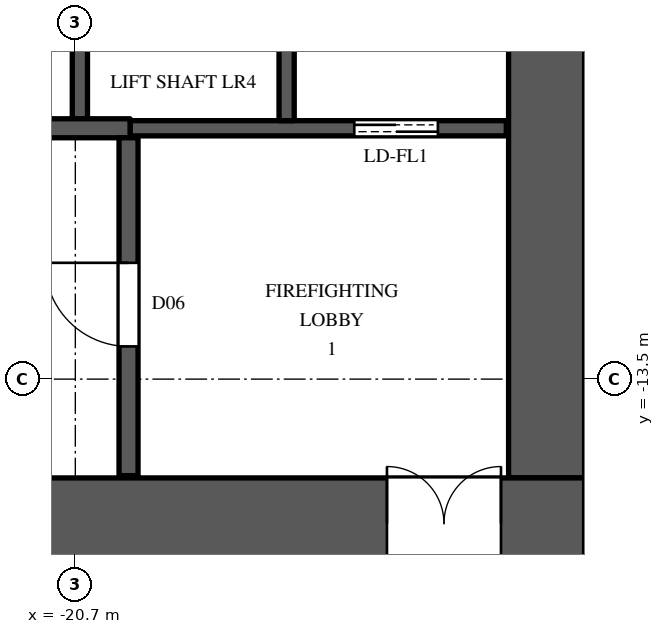
"""IFC4 building model, lengths in metres.
Left out: names, types, materials, properties, quantities, classifications, styles, units other than length and angle.
Written with IfcOpenShell. Run it as: python <this file> out.ifc"""

import sys

from ifc_helpers import new_model, si_unit, direction, frame, frame_2d, origin, place, context, subcontext, project, spatial, rectangle, extrude, element, fill, save


model = new_model("IFC4")
c1 = context("Model", 3, precision=1e-05, world=origin(), true_north=direction((0.0, 1.0)))
c2 = subcontext(c1, "Body", "Model", "MODEL_VIEW")
j1 = project(units=[si_unit("LENGTHUNIT", "METRE"), si_unit("PLANEANGLEUNIT", "RADIAN")], contexts=[c1])
p1 = place(None, origin())
s1 = spatial("IfcSite", under=j1, at=p1, CompositionType="ELEMENT")
p2 = place(p1, origin())
s2 = spatial("IfcBuilding", under=s1, at=p2, CompositionType="ELEMENT")
p3 = place(p2, frame((0.0, 0.0, 138.3)))
s3 = spatial("IfcBuildingStorey", under=s2, at=p3, CompositionType="ELEMENT", Elevation=138.3)
p4 = place(p3, frame((-30.0, -15.4, 0.0), z_axis=(0.0, 0.0, 1.0), x_axis=(1.0, 0.0, 0.0)))
e1 = element("IfcWall", 1, at=p4, inside=s3, PredefinedType="SHEAR", context=c2, shape_type="SweptSolid", body=[
    extrude(rectangle(XDim=16.0, YDim=1.2, at=frame_2d((8.0, 0.0))), origin(), (0.0, 0.0, 1.0), 3.6),
])
p5 = place(p4, frame((13.4, 0.0, 0.0)))
e2 = element("IfcOpeningElement", 2, at=p5, cuts=e1, PredefinedType="OPENING", context=c2, shape_type="SweptSolid", body=[
    extrude(rectangle(XDim=1.5, YDim=2.4, at=frame_2d((0.75, 1.2))), frame((0.0, 0.61, 0.0), z_axis=(0.0, -1.0, 0.0), x_axis=(1.0, 0.0, 0.0)), (0.0, 0.0, 1.0), 1.22),
])
p6 = place(p3, frame((-14.5, -14.8, 0.0), z_axis=(0.0, 0.0, 1.0), x_axis=(0.0, 1.0, 0.0)))
e3 = element("IfcWall", 3, at=p6, inside=s3, PredefinedType="SHEAR", context=c2, shape_type="SweptSolid", body=[
    extrude(rectangle(XDim=29.6, YDim=1.0, at=frame_2d((14.8, 0.0))), origin(), (0.0, 0.0, 1.0), 3.6),
])
p7 = place(p6, frame((8.45, 0.0, 0.0)))
e4 = element("IfcOpeningElement", 4, at=p7, cuts=e3, PredefinedType="OPENING", context=c2, shape_type="SweptSolid", body=[
    extrude(rectangle(XDim=1.5, YDim=2.4, at=frame_2d((0.75, 1.2))), frame((0.0, 0.51, 0.0), z_axis=(0.0, -1.0, 0.0), x_axis=(1.0, 0.0, 0.0)), (0.0, 0.0, 1.0), 1.02),
])
p8 = place(p6, frame((19.65, 0.0, 0.0)))
e5 = element("IfcOpeningElement", 5, at=p8, cuts=e3, PredefinedType="OPENING", context=c2, shape_type="SweptSolid", body=[
    extrude(rectangle(XDim=1.5, YDim=2.4, at=frame_2d((0.75, 1.2))), frame((0.0, 0.51, 0.0), z_axis=(0.0, -1.0, 0.0), x_axis=(1.0, 0.0, 0.0)), (0.0, 0.0, 1.0), 1.02),
])
p9 = place(p6, frame((14.5, 0.0, 0.0)))
e6 = element("IfcOpeningElement", 6, at=p9, cuts=e3, PredefinedType="OPENING", context=c2, shape_type="SweptSolid", body=[
    extrude(rectangle(XDim=0.6, YDim=2.0, at=frame_2d((0.3, 1.0))), frame((0.0, 0.51, 0.0), z_axis=(0.0, -1.0, 0.0), x_axis=(1.0, 0.0, 0.0)), (0.0, 0.0, 1.0), 1.02),
])
p10 = place(p3, frame((-20.64, -10.075, 0.0), z_axis=(0.0, 0.0, 1.0), x_axis=(0.0, 1.0, 0.0)))
e7 = element("IfcWall", 7, at=p10, inside=s3, PredefinedType="SHEAR", context=c2, shape_type="SweptSolid", body=[
    extrude(rectangle(XDim=2.575, YDim=0.2, at=frame_2d((1.288, 0.0))), origin(), (0.0, 0.0, 1.0), 3.6),
])
p11 = place(p3, frame((-19.98, -10.2, 0.0), z_axis=(0.0, 0.0, 1.0), x_axis=(1.0, 0.0, 0.0)))
e8 = element("IfcWall", 8, at=p11, inside=s3, PredefinedType="SHEAR", context=c2, shape_type="SweptSolid", body=[
    extrude(rectangle(XDim=4.95, YDim=0.2, at=frame_2d((2.475, 0.0))), origin(), (0.0, 0.0, 1.0), 3.3),
])
p12 = place(p11, frame((2.95, 0.0, 0.0)))
e9 = element("IfcOpeningElement", 9, at=p12, cuts=e8, PredefinedType="OPENING", context=c2, shape_type="SweptSolid", body=[
    extrude(rectangle(XDim=1.1, YDim=2.2, at=frame_2d((0.55, 1.1))), frame((0.0, 0.11, 0.0), z_axis=(0.0, -1.0, 0.0), x_axis=(1.0, 0.0, 0.0)), (0.0, 0.0, 1.0), 0.22),
])
p13 = place(p3, frame((-17.92, -10.1, 0.0), z_axis=(0.0, 0.0, 1.0), x_axis=(0.0, 1.0, 0.0)))
e10 = element("IfcWall", 10, at=p13, inside=s3, PredefinedType="SHEAR", context=c2, shape_type="SweptSolid", body=[
    extrude(rectangle(XDim=2.6, YDim=0.2, at=frame_2d((1.3, 0.0))), origin(), (0.0, 0.0, 1.0), 3.6),
])
p14 = place(p3, frame((-28.81, -10.2, 0.0), z_axis=(0.0, 0.0, 1.0), x_axis=(1.0, 0.0, 0.0)))
e11 = element("IfcWall", 11, at=p14, inside=s3, PredefinedType="SHEAR", context=c2, shape_type="SweptSolid", body=[
    extrude(rectangle(XDim=8.83, YDim=0.25, at=frame_2d((4.415, 0.0))), origin(), (0.0, 0.0, 1.0), 3.3),
])
p15 = place(p3, frame((-20.0, -14.77, 0.0), z_axis=(0.0, 0.0, 1.0), x_axis=(0.0, 1.0, 0.0)))
e12 = element("IfcWall", 12, at=p15, inside=s3, PredefinedType="SHEAR", context=c2, shape_type="SweptSolid", body=[
    extrude(rectangle(XDim=4.445, YDim=0.25, at=frame_2d((2.223, 0.0))), origin(), (0.0, 0.0, 1.0), 3.3),
])
p16 = place(p15, frame((1.7, 0.0, 0.0)))
e13 = element("IfcOpeningElement", 13, at=p16, cuts=e12, PredefinedType="OPENING", context=c2, shape_type="SweptSolid", body=[
    extrude(rectangle(XDim=1.1, YDim=2.2, at=frame_2d((0.55, 1.1))), frame((0.0, 0.135, 0.0), z_axis=(0.0, -1.0, 0.0), x_axis=(1.0, 0.0, 0.0)), (0.0, 0.0, 1.0), 0.27),
])
p17 = place(p16, origin())
e14 = element("IfcDoor", 14, at=p17, inside=s3, OperationType="SINGLE_SWING_RIGHT", PredefinedType="DOOR", context=c2, shape_type="SweptSolid", body=[
    extrude(rectangle(XDim=1.1, YDim=2.2, at=frame_2d((0.55, 1.1))), frame((0.0, 0.025, 0.0), z_axis=(0.0, -1.0, 0.0), x_axis=(1.0, 0.0, 0.0)), (0.0, 0.0, 1.0), 0.05),
])
fill(e13, e14)
p18 = place(p12, origin())
e15 = element("IfcDoor", 15, at=p18, inside=s3, OperationType="DOUBLE_DOOR_SLIDING", PredefinedType="DOOR", context=c2, shape_type="SweptSolid", body=[
    extrude(rectangle(XDim=1.1, YDim=2.2, at=frame_2d((0.55, 1.1))), frame((0.0, 0.025, 0.0), z_axis=(0.0, -1.0, 0.0), x_axis=(1.0, 0.0, 0.0)), (0.0, 0.0, 1.0), 0.05),
])
fill(e9, e15)
p19 = place(p5, origin())
e16 = element("IfcDoor", 16, at=p19, inside=s3, OperationType="DOUBLE_DOOR_SINGLE_SWING", PredefinedType="DOOR", context=c2, shape_type="SweptSolid", body=[
    extrude(rectangle(XDim=1.5, YDim=2.4, at=frame_2d((0.75, 1.2))), frame((0.0, 0.025, 0.0), z_axis=(0.0, -1.0, 0.0), x_axis=(1.0, 0.0, 0.0)), (0.0, 0.0, 1.0), 0.05),
])
fill(e2, e16)
save(model, sys.argv[1])
